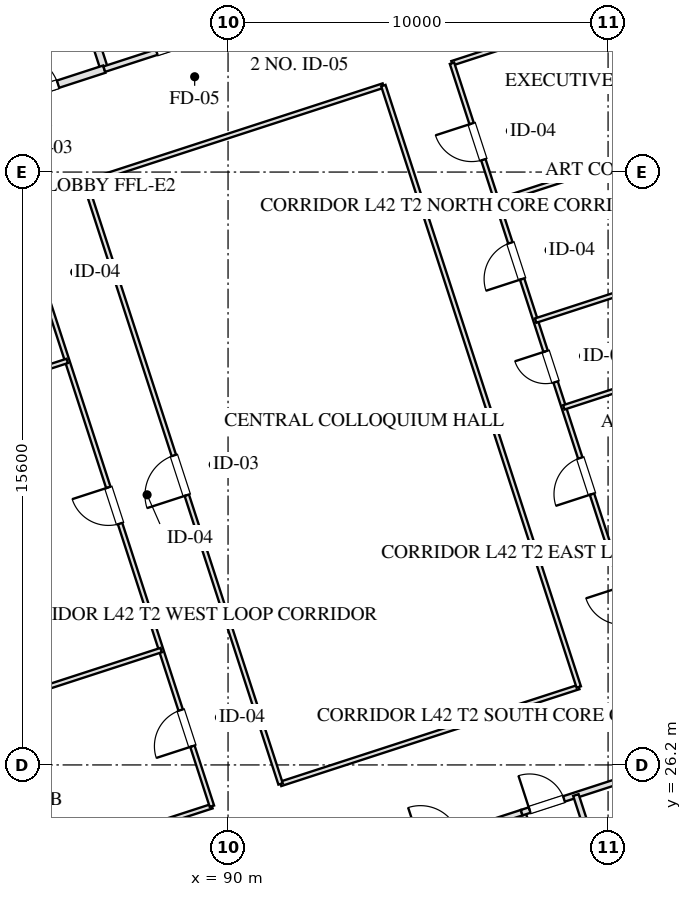
"""IFC4 building model, lengths in metres.
Left out: names, types, materials, properties, quantities, classifications, styles, units other than length and angle.
Written with IfcOpenShell. Run it as: python <this file> out.ifc"""

import sys

from ifc_helpers import new_model, si_unit, direction, frame, frame_2d, origin, place, context, subcontext, project, spatial, rectangle, extrude, element, fill, save


model = new_model("IFC4")
c1 = context("Model", 3, precision=1e-05, world=origin(), true_north=direction((0.0, 1.0)))
c2 = subcontext(c1, "Body", "Model", "MODEL_VIEW")
j1 = project(units=[si_unit("LENGTHUNIT", "METRE"), si_unit("PLANEANGLEUNIT", "RADIAN")], contexts=[c1])
p1 = place(None, origin())
s1 = spatial("IfcSite", under=j1, at=p1, CompositionType="ELEMENT")
p2 = place(p1, origin())
s2 = spatial("IfcBuilding", under=s1, at=p2, CompositionType="ELEMENT")
p3 = place(p2, frame((0.0, 0.0, 159.85)))
s3 = spatial("IfcBuildingStorey", under=s2, at=p3, CompositionType="ELEMENT", Elevation=159.85)
p4 = place(p3, frame((98.224, 59.173, 0.0), z_axis=(0.0, 0.0, 1.0), x_axis=(0.309014228706, -0.951057414911, 0.0)))
e1 = element("IfcWall", 1, at=p4, inside=s3, PredefinedType="SOLIDWALL", context=c2, shape_type="SweptSolid", body=[
    extrude(rectangle(XDim=42.8, YDim=0.4, at=frame_2d((21.4, 0.0))), origin(), (0.0, 0.0, 1.0), 2.61),
])
p5 = place(p3, frame((97.727, 24.944, 0.0), z_axis=(0.0, 0.0, 1.0), x_axis=(0.309016001439, -0.951056838919, 0.0)))
e2 = element("IfcWall", 2, at=p5, inside=s3, PredefinedType="PARTITIONING", context=c2, shape_type="SweptSolid", body=[
    extrude(rectangle(XDim=8.43, YDim=0.2, at=frame_2d((4.215, 0.0))), origin(), (0.0, 0.0, 1.0), 3.175),
])
p6 = place(p3, frame((93.542, 23.585, 0.0), z_axis=(0.0, 0.0, 1.0), x_axis=(0.951063829732, 0.308994485023, 0.0)))
e3 = element("IfcWall", 3, at=p6, inside=s3, PredefinedType="PARTITIONING", context=c2, shape_type="SweptSolid", body=[
    extrude(rectangle(XDim=4.4, YDim=0.15, at=frame_2d((2.2, 0.0))), origin(), (0.0, 0.0, 1.0), 3.175),
])
p7 = place(p6, frame((1.6, 0.0, 0.0)))
e4 = element("IfcOpeningElement", 4, at=p7, cuts=e3, PredefinedType="OPENING", context=c2, shape_type="SweptSolid", body=[
    extrude(rectangle(XDim=1.05, YDim=2.05, at=frame_2d((0.525, 1.025))), frame((0.0, 0.085, 0.0), z_axis=(0.0, -1.0, 0.0), x_axis=(1.0, 0.0, 0.0)), (0.0, 0.0, 1.0), 0.17),
])
p8 = place(p3, frame((97.727, 24.944, 0.0), z_axis=(0.0, 0.0, 1.0), x_axis=(0.951036872128, 0.309077446369, 0.0)))
e5 = element("IfcWall", 5, at=p8, inside=s3, PredefinedType="PARTITIONING", context=c2, shape_type="SweptSolid", body=[
    extrude(rectangle(XDim=3.2, YDim=0.15, at=frame_2d((1.6, 0.0))), origin(), (0.0, 0.0, 1.0), 3.175),
])
p9 = place(p8, frame((0.22, 0.0, 0.0)))
e6 = element("IfcOpeningElement", 6, at=p9, cuts=e5, PredefinedType="OPENING", context=c2, shape_type="SweptSolid", body=[
    extrude(rectangle(XDim=0.95, YDim=2.05, at=frame_2d((0.475, 1.025))), frame((0.0, 0.085, 0.0), z_axis=(0.0, -1.0, 0.0), x_axis=(1.0, 0.0, 0.0)), (0.0, 0.0, 1.0), 0.17),
])
p10 = place(p3, frame((99.153, 25.408, 0.0), z_axis=(0.0, 0.0, 1.0), x_axis=(0.309016001439, -0.951056838919, 0.0)))
e7 = element("IfcWall", 7, at=p10, inside=s3, PredefinedType="PARTITIONING", context=c2, shape_type="SweptSolid", body=[
    extrude(rectangle(XDim=8.43, YDim=0.15, at=frame_2d((4.215, 0.0))), origin(), (0.0, 0.0, 1.0), 3.175),
])
p11 = place(p10, frame((2.55, 0.0, 0.0)))
e8 = element("IfcOpeningElement", 8, at=p11, cuts=e7, PredefinedType="OPENING", context=c2, shape_type="SweptSolid", body=[
    extrude(rectangle(XDim=0.95, YDim=2.05, at=frame_2d((0.475, 1.025))), frame((0.0, 0.085, 0.0), z_axis=(0.0, -1.0, 0.0), x_axis=(1.0, 0.0, 0.0)), (0.0, 0.0, 1.0), 0.17),
])
p12 = place(p10, frame((5.8, 0.0, 0.0)))
e9 = element("IfcOpeningElement", 9, at=p12, cuts=e7, PredefinedType="OPENING", context=c2, shape_type="SweptSolid", body=[
    extrude(rectangle(XDim=0.9, YDim=2.05, at=frame_2d((0.45, 1.025))), frame((0.0, 0.085, 0.0), z_axis=(0.0, -1.0, 0.0), x_axis=(1.0, 0.0, 0.0)), (0.0, 0.0, 1.0), 0.17),
])
p13 = place(p3, frame((86.743, 44.508, 0.0), z_axis=(0.0, 0.0, 1.0), x_axis=(-0.309016001439, 0.951056838919, 0.0)))
e10 = element("IfcWall", 10, at=p13, inside=s3, PredefinedType="PARTITIONING", context=c2, shape_type="SweptSolid", body=[
    extrude(rectangle(XDim=8.43, YDim=0.2, at=frame_2d((4.215, 0.0))), origin(), (0.0, 0.0, 1.0), 3.175),
])
p14 = place(p3, frame((83.101, 43.324, 0.0), z_axis=(0.0, 0.0, 1.0), x_axis=(0.951052804469, 0.309028417967, 0.0)))
e11 = element("IfcWall", 11, at=p14, inside=s3, PredefinedType="PARTITIONING", context=c2, shape_type="SweptSolid", body=[
    extrude(rectangle(XDim=3.83, YDim=0.2, at=frame_2d((1.915, 0.0))), origin(), (0.0, 0.0, 1.0), 3.175),
])
p15 = place(p14, frame((1.35, 0.0, 0.0)))
e12 = element("IfcOpeningElement", 12, at=p15, cuts=e11, PredefinedType="OPENING", context=c2, shape_type="SweptSolid", body=[
    extrude(rectangle(XDim=1.2, YDim=2.05, at=frame_2d((0.6, 1.025))), frame((0.0, 0.11, 0.0), z_axis=(0.0, -1.0, 0.0), x_axis=(1.0, 0.0, 0.0)), (0.0, 0.0, 1.0), 0.22),
])
p16 = place(p3, frame((86.743, 44.508, 0.0), z_axis=(0.0, 0.0, 1.0), x_axis=(0.951063829732, 0.308994485023, 0.0)))
e13 = element("IfcWall", 13, at=p16, inside=s3, PredefinedType="PARTITIONING", context=c2, shape_type="SweptSolid", body=[
    extrude(rectangle(XDim=4.4, YDim=0.15, at=frame_2d((2.2, 0.0))), origin(), (0.0, 0.0, 1.0), 3.175),
])
p17 = place(p16, frame((1.45, 0.0, 0.0)))
e14 = element("IfcOpeningElement", 14, at=p17, cuts=e13, PredefinedType="OPENING", context=c2, shape_type="SweptSolid", body=[
    extrude(rectangle(XDim=1.5, YDim=2.05, at=frame_2d((0.75, 1.025))), frame((0.0, 0.085, 0.0), z_axis=(0.0, -1.0, 0.0), x_axis=(1.0, 0.0, 0.0)), (0.0, 0.0, 1.0), 0.17),
])
p18 = place(p3, frame((77.925, 21.328, 0.0), z_axis=(0.0, 0.0, 1.0), x_axis=(0.95105749975, 0.309013967595, 0.0)))
e15 = element("IfcWall", 15, at=p18, inside=s3, PredefinedType="PARTITIONING", context=c2, shape_type="SweptSolid", body=[
    extrude(rectangle(XDim=12.25, YDim=0.12, at=frame_2d((6.125, 0.0))), origin(), (0.0, 0.0, 1.0), 3.175),
])
p19 = place(p3, frame((91.382, 25.701, 0.0), z_axis=(0.0, 0.0, 1.0), x_axis=(0.951061683147, 0.309001091988, 0.0)))
e16 = element("IfcWall", 16, at=p19, inside=s3, PredefinedType="PARTITIONING", context=c2, shape_type="SweptSolid", body=[
    extrude(rectangle(XDim=8.25, YDim=0.12, at=frame_2d((4.125, 0.0))), origin(), (0.0, 0.0, 1.0), 3.175),
])
p20 = place(p3, frame((86.24, 41.527, 0.0), z_axis=(0.0, 0.0, 1.0), x_axis=(0.951058857521, 0.309009788731, 0.0)))
e17 = element("IfcWall", 17, at=p20, inside=s3, PredefinedType="PARTITIONING", context=c2, shape_type="SweptSolid", body=[
    extrude(rectangle(XDim=8.25, YDim=0.12, at=frame_2d((4.125, 0.0))), origin(), (0.0, 0.0, 1.0), 3.175),
])
p21 = place(p3, frame((95.893, 44.663, 0.0), z_axis=(0.0, 0.0, 1.0), x_axis=(0.951059735424, 0.30900708674, 0.0)))
e18 = element("IfcWall", 18, at=p21, inside=s3, PredefinedType="PARTITIONING", context=c2, shape_type="SweptSolid", body=[
    extrude(rectangle(XDim=6.5, YDim=0.12, at=frame_2d((3.25, 0.0))), origin(), (0.0, 0.0, 1.0), 3.175),
])
p22 = place(p3, frame((89.575, 25.114, 0.0), z_axis=(0.0, 0.0, 1.0), x_axis=(-0.30901773025, 0.951056277195, 0.0)))
e19 = element("IfcWall", 19, at=p22, inside=s3, PredefinedType="PARTITIONING", context=c2, shape_type="SweptSolid", body=[
    extrude(rectangle(XDim=16.64, YDim=0.12, at=frame_2d((8.32, 0.0))), origin(), (0.0, 0.0, 1.0), 3.175),
])
p23 = place(p22, frame((1.66, 0.0, 0.0)))
e20 = element("IfcOpeningElement", 20, at=p23, cuts=e19, PredefinedType="OPENING", context=c2, shape_type="SweptSolid", body=[
    extrude(rectangle(XDim=1.0, YDim=2.05, at=frame_2d((0.5, 1.025))), frame((0.0, 0.07, 0.0), z_axis=(0.0, -1.0, 0.0), x_axis=(1.0, 0.0, 0.0)), (0.0, 0.0, 1.0), 0.14),
])
p24 = place(p22, frame((7.82, 0.0, 0.0)))
e21 = element("IfcOpeningElement", 21, at=p24, cuts=e19, PredefinedType="OPENING", context=c2, shape_type="SweptSolid", body=[
    extrude(rectangle(XDim=1.0, YDim=2.05, at=frame_2d((0.5, 1.025))), frame((0.0, 0.07, 0.0), z_axis=(0.0, -1.0, 0.0), x_axis=(1.0, 0.0, 0.0)), (0.0, 0.0, 1.0), 0.14),
])
p25 = place(p22, frame((13.98, 0.0, 0.0)))
e22 = element("IfcOpeningElement", 22, at=p25, cuts=e19, PredefinedType="OPENING", context=c2, shape_type="SweptSolid", body=[
    extrude(rectangle(XDim=1.0, YDim=2.05, at=frame_2d((0.5, 1.025))), frame((0.0, 0.07, 0.0), z_axis=(0.0, -1.0, 0.0), x_axis=(1.0, 0.0, 0.0)), (0.0, 0.0, 1.0), 0.14),
])
p26 = place(p3, frame((91.382, 25.701, 0.0), z_axis=(0.0, 0.0, 1.0), x_axis=(-0.309004459387, 0.951060589068, 0.0)))
e23 = element("IfcWall", 23, at=p26, inside=s3, PredefinedType="PARTITIONING", context=c2, shape_type="SweptSolid", body=[
    extrude(rectangle(XDim=16.64, YDim=0.12, at=frame_2d((8.32, 0.0))), origin(), (0.0, 0.0, 1.0), 3.175),
])
p27 = place(p26, frame((7.987, 0.0, 0.0)))
e24 = element("IfcOpeningElement", 24, at=p27, cuts=e23, PredefinedType="OPENING", context=c2, shape_type="SweptSolid", body=[
    extrude(rectangle(XDim=1.1, YDim=2.05, at=frame_2d((0.55, 1.025))), frame((0.0, 0.07, 0.0), z_axis=(0.0, -1.0, 0.0), x_axis=(1.0, 0.0, 0.0)), (0.0, 0.0, 1.0), 0.14),
])
p28 = place(p3, frame((99.229, 28.25, 0.0), z_axis=(0.0, 0.0, 1.0), x_axis=(-0.30901773025, 0.951056277195, 0.0)))
e25 = element("IfcWall", 25, at=p28, inside=s3, PredefinedType="PARTITIONING", context=c2, shape_type="SweptSolid", body=[
    extrude(rectangle(XDim=16.64, YDim=0.12, at=frame_2d((8.32, 0.0))), origin(), (0.0, 0.0, 1.0), 3.175),
])
p29 = place(p3, frame((101.035, 28.837, 0.0), z_axis=(0.0, 0.0, 1.0), x_axis=(-0.30901773025, 0.951056277195, 0.0)))
e26 = element("IfcWall", 26, at=p29, inside=s3, PredefinedType="PARTITIONING", context=c2, shape_type="SweptSolid", body=[
    extrude(rectangle(XDim=16.64, YDim=0.12, at=frame_2d((8.32, 0.0))), origin(), (0.0, 0.0, 1.0), 3.175),
])
p30 = place(p29, frame((1.16, 0.0, 0.0)))
e27 = element("IfcOpeningElement", 27, at=p30, cuts=e26, PredefinedType="OPENING", context=c2, shape_type="SweptSolid", body=[
    extrude(rectangle(XDim=1.0, YDim=2.05, at=frame_2d((0.5, 1.025))), frame((0.0, 0.07, 0.0), z_axis=(0.0, -1.0, 0.0), x_axis=(1.0, 0.0, 0.0)), (0.0, 0.0, 1.0), 0.14),
])
p31 = place(p29, frame((4.72, 0.0, 0.0)))
e28 = element("IfcOpeningElement", 28, at=p31, cuts=e26, PredefinedType="OPENING", context=c2, shape_type="SweptSolid", body=[
    extrude(rectangle(XDim=1.0, YDim=2.05, at=frame_2d((0.5, 1.025))), frame((0.0, 0.07, 0.0), z_axis=(0.0, -1.0, 0.0), x_axis=(1.0, 0.0, 0.0)), (0.0, 0.0, 1.0), 0.14),
])
p32 = place(p29, frame((7.82, 0.0, 0.0)))
e29 = element("IfcOpeningElement", 29, at=p32, cuts=e26, PredefinedType="OPENING", context=c2, shape_type="SweptSolid", body=[
    extrude(rectangle(XDim=0.85, YDim=2.05, at=frame_2d((0.425, 1.025))), frame((0.0, 0.07, 0.0), z_axis=(0.0, -1.0, 0.0), x_axis=(1.0, 0.0, 0.0)), (0.0, 0.0, 1.0), 0.14),
])
p33 = place(p29, frame((10.671, 0.0, 0.0)))
e30 = element("IfcOpeningElement", 30, at=p33, cuts=e26, PredefinedType="OPENING", context=c2, shape_type="SweptSolid", body=[
    extrude(rectangle(XDim=1.0, YDim=2.05, at=frame_2d((0.5, 1.025))), frame((0.0, 0.07, 0.0), z_axis=(0.0, -1.0, 0.0), x_axis=(1.0, 0.0, 0.0)), (0.0, 0.0, 1.0), 0.14),
])
p34 = place(p29, frame((13.971, 0.0, 0.0)))
e31 = element("IfcOpeningElement", 31, at=p34, cuts=e26, PredefinedType="OPENING", context=c2, shape_type="SweptSolid", body=[
    extrude(rectangle(XDim=1.0, YDim=2.05, at=frame_2d((0.5, 1.025))), frame((0.0, 0.07, 0.0), z_axis=(0.0, -1.0, 0.0), x_axis=(1.0, 0.0, 0.0)), (0.0, 0.0, 1.0), 0.14),
])
for number, where, z_axis, x_axis in (
    (32, (76.59, 25.437, 0.0), (0.0, 0.0, 1.0), (0.951, 0.309, 0.0)),
    (33, (74.118, 33.045, 0.0), (0.0, 0.0, 1.0), (0.951, 0.309, 0.0)),
):
    element("IfcWall", number, at=place(p3, frame(where, z_axis=z_axis, x_axis=x_axis)), inside=s3, PredefinedType="PARTITIONING", context=c2, shape_type="SweptSolid", body=[
        extrude(rectangle(XDim=12.25, YDim=0.12, at=frame_2d((6.125, 0.0))), origin(), (0.0, 0.0, 1.0), 3.175),
    ])
for number, where, z_axis, x_axis in (
    (34, (100.01, 31.995, 0.0), (0.0, 0.0, 1.0), (0.951, 0.309, 0.0)),
    (35, (98.835, 35.609, 0.0), (0.0, 0.0, 1.0), (0.951, 0.309, 0.0)),
    (36, (98.094, 37.892, 0.0), (0.0, 0.0, 1.0), (0.951, 0.309, 0.0)),
    (37, (97.073, 41.031, 0.0), (0.0, 0.0, 1.0), (0.951, 0.309, 0.0)),
):
    element("IfcWall", number, at=place(p3, frame(where, z_axis=z_axis, x_axis=x_axis)), inside=s3, PredefinedType="PARTITIONING", context=c2, shape_type="SweptSolid", body=[
        extrude(rectangle(XDim=6.5, YDim=0.12, at=frame_2d((3.25, 0.0))), origin(), (0.0, 0.0, 1.0), 3.175),
    ])
p35 = place(p9, origin())
e38 = element("IfcDoor", 38, at=p35, inside=s3, OperationType="SINGLE_SWING_LEFT", PredefinedType="DOOR", context=c2, shape_type="SweptSolid", body=[
    extrude(rectangle(XDim=0.95, YDim=2.05, at=frame_2d((0.475, 1.025))), frame((0.0, 0.025, 0.0), z_axis=(0.0, -1.0, 0.0), x_axis=(1.0, 0.0, 0.0)), (0.0, 0.0, 1.0), 0.05),
])
fill(e6, e38)
p36 = place(p15, origin())
e39 = element("IfcDoor", 39, at=p36, inside=s3, OperationType="SINGLE_SWING_LEFT", PredefinedType="DOOR", context=c2, shape_type="SweptSolid", body=[
    extrude(rectangle(XDim=1.2, YDim=2.05, at=frame_2d((0.6, 1.025))), frame((0.0, 0.025, 0.0), z_axis=(0.0, -1.0, 0.0), x_axis=(1.0, 0.0, 0.0)), (0.0, 0.0, 1.0), 0.05),
])
fill(e12, e39)
p37 = place(p17, origin())
e40 = element("IfcDoor", 40, at=p37, inside=s3, OperationType="SINGLE_SWING_LEFT", PredefinedType="DOOR", context=c2, shape_type="SweptSolid", body=[
    extrude(rectangle(XDim=1.5, YDim=2.05, at=frame_2d((0.75, 1.025))), frame((0.0, 0.025, 0.0), z_axis=(0.0, -1.0, 0.0), x_axis=(1.0, 0.0, 0.0)), (0.0, 0.0, 1.0), 0.05),
])
fill(e14, e40)
p38 = place(p23, origin())
e41 = element("IfcDoor", 41, at=p38, inside=s3, OperationType="SINGLE_SWING_LEFT", PredefinedType="DOOR", context=c2, shape_type="SweptSolid", body=[
    extrude(rectangle(XDim=1.0, YDim=2.05, at=frame_2d((0.5, 1.025))), frame((0.0, 0.025, 0.0), z_axis=(0.0, -1.0, 0.0), x_axis=(1.0, 0.0, 0.0)), (0.0, 0.0, 1.0), 0.05),
])
fill(e20, e41)
p39 = place(p24, origin())
e42 = element("IfcDoor", 42, at=p39, inside=s3, OperationType="SINGLE_SWING_RIGHT", PredefinedType="DOOR", context=c2, shape_type="SweptSolid", body=[
    extrude(rectangle(XDim=1.0, YDim=2.05, at=frame_2d((0.5, 1.025))), frame((0.0, 0.025, 0.0), z_axis=(0.0, -1.0, 0.0), x_axis=(1.0, 0.0, 0.0)), (0.0, 0.0, 1.0), 0.05),
])
fill(e21, e42)
p40 = place(p27, origin())
e43 = element("IfcDoor", 43, at=p40, inside=s3, OperationType="SINGLE_SWING_LEFT", PredefinedType="DOOR", context=c2, shape_type="SweptSolid", body=[
    extrude(rectangle(XDim=1.1, YDim=2.05, at=frame_2d((0.55, 1.025))), frame((0.0, 0.025, 0.0), z_axis=(0.0, -1.0, 0.0), x_axis=(1.0, 0.0, 0.0)), (0.0, 0.0, 1.0), 0.05),
])
fill(e24, e43)
p41 = place(p31, origin())
e44 = element("IfcDoor", 44, at=p41, inside=s3, OperationType="SINGLE_SWING_LEFT", PredefinedType="DOOR", context=c2, shape_type="SweptSolid", body=[
    extrude(rectangle(XDim=1.0, YDim=2.05, at=frame_2d((0.5, 1.025))), frame((0.0, 0.025, 0.0), z_axis=(0.0, -1.0, 0.0), x_axis=(1.0, 0.0, 0.0)), (0.0, 0.0, 1.0), 0.05),
])
fill(e28, e44)
p42 = place(p32, origin())
e45 = element("IfcDoor", 45, at=p42, inside=s3, OperationType="SINGLE_SWING_RIGHT", PredefinedType="DOOR", context=c2, shape_type="SweptSolid", body=[
    extrude(rectangle(XDim=0.85, YDim=2.05, at=frame_2d((0.425, 1.025))), frame((0.0, 0.025, 0.0), z_axis=(0.0, -1.0, 0.0), x_axis=(1.0, 0.0, 0.0)), (0.0, 0.0, 1.0), 0.05),
])
fill(e29, e45)
p43 = place(p33, origin())
e46 = element("IfcDoor", 46, at=p43, inside=s3, OperationType="SINGLE_SWING_LEFT", PredefinedType="DOOR", context=c2, shape_type="SweptSolid", body=[
    extrude(rectangle(XDim=1.0, YDim=2.05, at=frame_2d((0.5, 1.025))), frame((0.0, 0.025, 0.0), z_axis=(0.0, -1.0, 0.0), x_axis=(1.0, 0.0, 0.0)), (0.0, 0.0, 1.0), 0.05),
])
fill(e30, e46)
p44 = place(p34, origin())
e47 = element("IfcDoor", 47, at=p44, inside=s3, OperationType="SINGLE_SWING_RIGHT", PredefinedType="DOOR", context=c2, shape_type="SweptSolid", body=[
    extrude(rectangle(XDim=1.0, YDim=2.05, at=frame_2d((0.5, 1.025))), frame((0.0, 0.025, 0.0), z_axis=(0.0, -1.0, 0.0), x_axis=(1.0, 0.0, 0.0)), (0.0, 0.0, 1.0), 0.05),
])
fill(e31, e47)
save(model, sys.argv[1])
